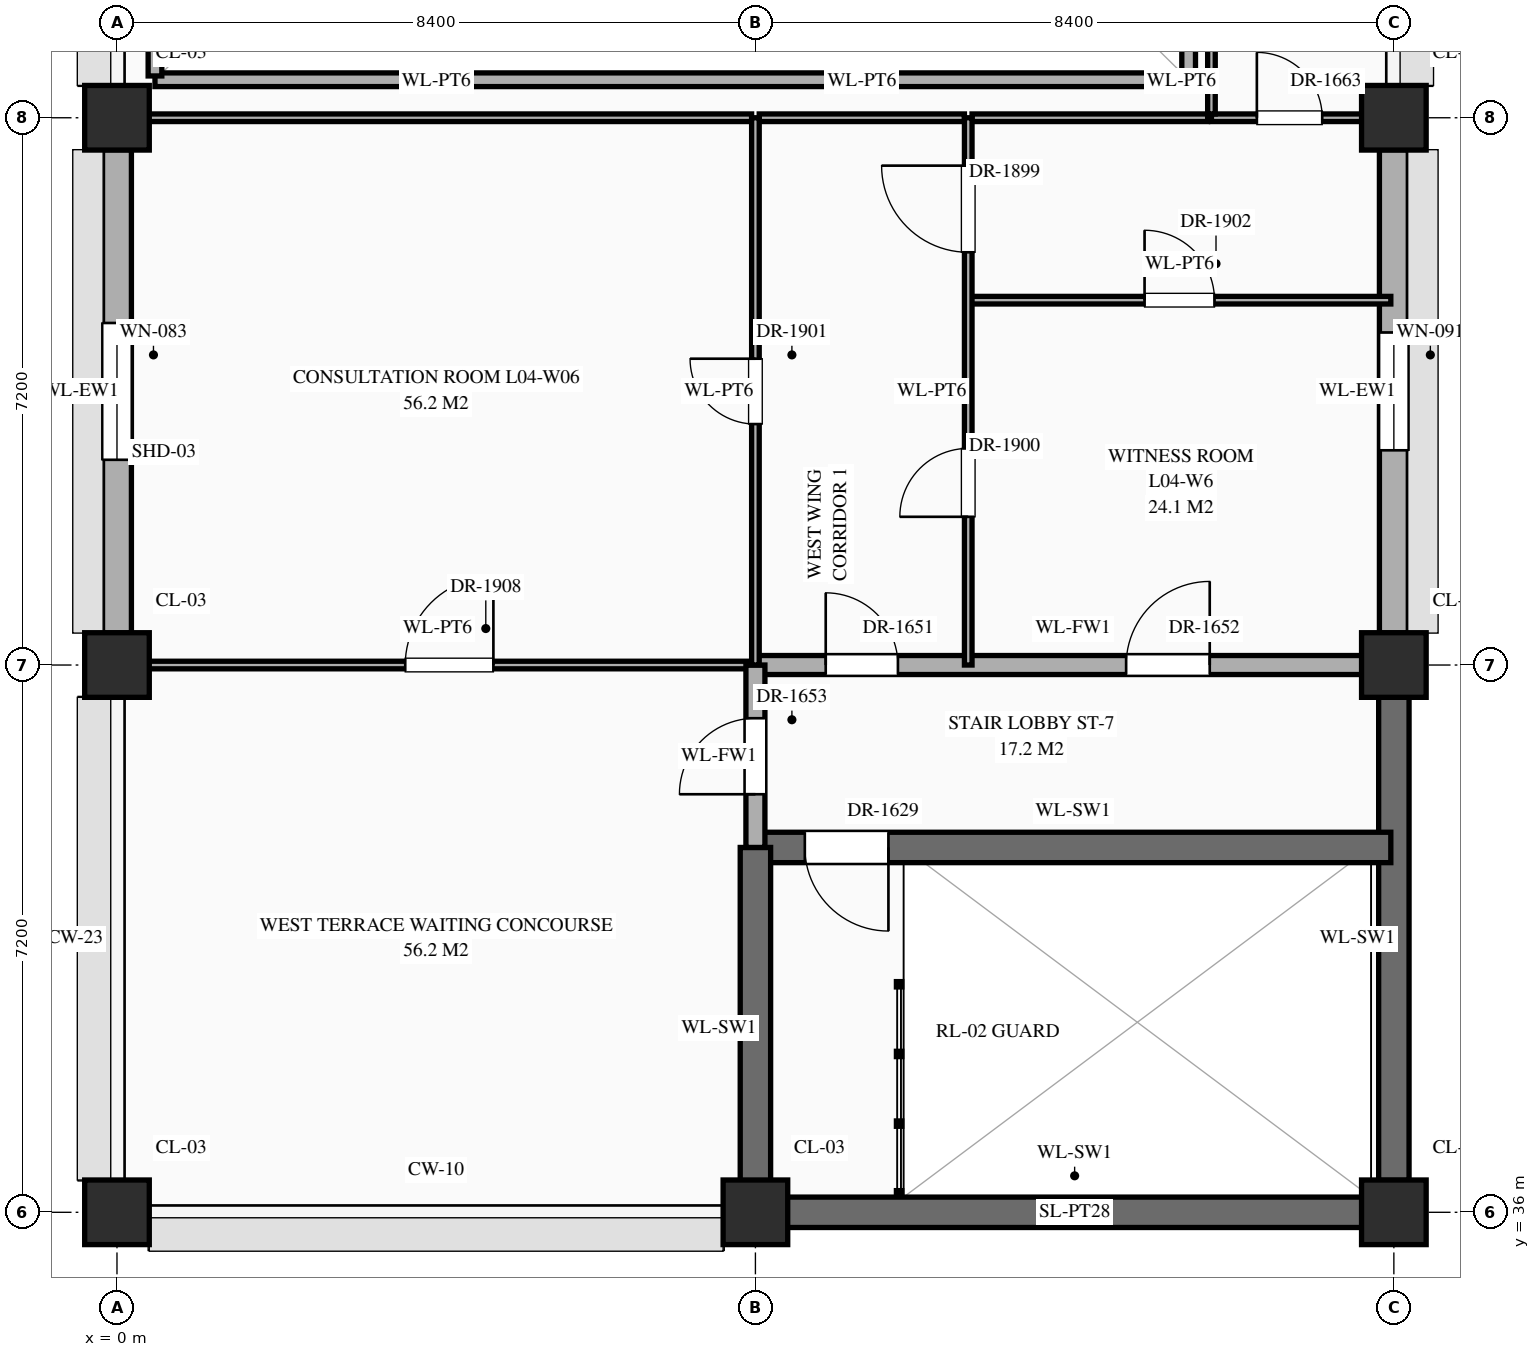
"""IFC4 building model, lengths in metres.
Left out: names, types, materials, properties, quantities, classifications, styles, units other than length and angle.
Written with IfcOpenShell. Run it as: python <this file> out.ifc"""

import sys

from ifc_helpers import new_model, si_unit, direction, frame, frame_2d, origin, origin_2d, place, context, subcontext, project, spatial, rectangle, extrude, element, fill, save


model = new_model("IFC4")
c1 = context("Model", 3, precision=1e-05, world=origin(), true_north=direction((0.0, 1.0)))
c2 = subcontext(c1, "Body", "Model", "MODEL_VIEW")
j1 = project(units=[si_unit("LENGTHUNIT", "METRE"), si_unit("PLANEANGLEUNIT", "RADIAN")], contexts=[c1])
p1 = place(None, origin())
s1 = spatial("IfcSite", under=j1, at=p1, CompositionType="ELEMENT")
p2 = place(p1, origin())
s2 = spatial("IfcBuilding", under=s1, at=p2, CompositionType="ELEMENT")
p3 = place(p2, frame((0.0, 0.0, 16.2)))
s3 = spatial("IfcBuildingStorey", under=s2, at=p3, CompositionType="ELEMENT", Elevation=16.2)
for number, where, z_axis, x_axis in (
    (1, (0.0, 36.0, 0.0), (0.0, 0.0, 1.0), (1.0, 0.0, 0.0)),
    (2, (0.0, 43.2, 0.0), (0.0, 0.0, 1.0), (1.0, 0.0, 0.0)),
    (3, (0.0, 50.4, 0.0), (0.0, 0.0, 1.0), (1.0, 0.0, 0.0)),
    (4, (8.4, 36.0, 0.0), (0.0, 0.0, 1.0), (1.0, 0.0, 0.0)),
    (5, (16.8, 36.0, 0.0), (0.0, 0.0, 1.0), (1.0, 0.0, 0.0)),
    (6, (16.8, 43.2, 0.0), (0.0, 0.0, 1.0), (1.0, 0.0, 0.0)),
    (7, (16.8, 50.4, 0.0), (0.0, 0.0, 1.0), (1.0, 0.0, 0.0)),
):
    element("IfcColumn", number, at=place(p3, frame(where, z_axis=z_axis, x_axis=x_axis)), inside=s3, PredefinedType="COLUMN", context=c2, shape_type="SweptSolid", body=[
        extrude(rectangle(XDim=0.85, YDim=0.85, at=origin_2d()), origin(), (0.0, 0.0, 1.0), 5.4),
    ])
p4 = place(p3, frame((0.0, 43.62, 0.0), z_axis=(0.0, 0.0, 1.0), x_axis=(0.0, 1.0, 0.0)))
e8 = element("IfcWall", 8, at=p4, inside=s3, PredefinedType="STANDARD", context=c2, shape_type="SweptSolid", body=[
    extrude(rectangle(XDim=6.36, YDim=0.38, at=frame_2d((3.18, 0.0))), origin(), (0.0, 0.0, 1.0), 4.55),
])
p5 = place(p4, frame((2.28, 0.0, 0.85)))
e9 = element("IfcOpeningElement", 9, at=p5, cuts=e8, PredefinedType="OPENING", context=c2, shape_type="SweptSolid", body=[
    extrude(rectangle(XDim=1.8, YDim=1.2, at=frame_2d((0.9, 0.6))), frame((0.0, 0.202, 0.0), z_axis=(0.0, -1.0, 0.0), x_axis=(1.0, 0.0, 0.0)), (0.0, 0.0, 1.0), 0.404),
])
p6 = place(p3, frame((8.82, 36.0, 0.0), z_axis=(0.0, 0.0, 1.0), x_axis=(1.0, 0.0, 0.0)))
e10 = element("IfcWall", 10, at=p6, inside=s3, PredefinedType="SHEAR", context=c2, shape_type="SweptSolid", body=[
    extrude(rectangle(XDim=7.56, YDim=0.4, at=frame_2d((3.78, 0.0))), origin(), (0.0, 0.0, 1.0), 5.2),
])
p7 = place(p3, frame((16.8, 36.42, 0.0), z_axis=(0.0, 0.0, 1.0), x_axis=(0.0, 1.0, 0.0)))
e11 = element("IfcWall", 11, at=p7, inside=s3, PredefinedType="SHEAR", context=c2, shape_type="SweptSolid", body=[
    extrude(rectangle(XDim=6.36, YDim=0.4, at=frame_2d((3.18, 0.0))), origin(), (0.0, 0.0, 1.0), 5.2),
])
p8 = place(p3, frame((16.8, 43.62, 0.0), z_axis=(0.0, 0.0, 1.0), x_axis=(0.0, 1.0, 0.0)))
e12 = element("IfcWall", 12, at=p8, inside=s3, PredefinedType="STANDARD", context=c2, shape_type="SweptSolid", body=[
    extrude(rectangle(XDim=6.36, YDim=0.38, at=frame_2d((3.18, 0.0))), origin(), (0.0, 0.0, 1.0), 4.55),
])
p9 = place(p8, frame((2.405, 0.0, 0.85)))
e13 = element("IfcOpeningElement", 13, at=p9, cuts=e12, PredefinedType="OPENING", context=c2, shape_type="SweptSolid", body=[
    extrude(rectangle(XDim=1.55, YDim=1.92, at=frame_2d((0.775, 0.96))), frame((0.0, 0.202, 0.0), z_axis=(0.0, -1.0, 0.0), x_axis=(1.0, 0.0, 0.0)), (0.0, 0.0, 1.0), 0.404),
])
p10 = place(p3, frame((8.4, 40.8, 0.0), z_axis=(0.0, 0.0, 1.0), x_axis=(1.0, 0.0, 0.0)))
e14 = element("IfcWall", 14, at=p10, inside=s3, PredefinedType="SHEAR", context=c2, shape_type="SweptSolid", body=[
    extrude(rectangle(XDim=8.36, YDim=0.4, at=frame_2d((4.18, 0.0))), origin(), (0.0, 0.0, 1.0), 5.2),
])
p11 = place(p10, frame((0.65, 0.0, 0.0)))
e15 = element("IfcOpeningElement", 15, at=p11, cuts=e14, PredefinedType="OPENING", context=c2, shape_type="SweptSolid", body=[
    extrude(rectangle(XDim=1.1, YDim=2.2, at=frame_2d((0.55, 1.1))), frame((0.0, 0.212, 0.0), z_axis=(0.0, -1.0, 0.0), x_axis=(1.0, 0.0, 0.0)), (0.0, 0.0, 1.0), 0.424),
])
p12 = place(p3, frame((0.04, 43.2, 0.0), z_axis=(0.0, 0.0, 1.0), x_axis=(1.0, 0.0, 0.0)))
e16 = element("IfcWall", 16, at=p12, inside=s3, PredefinedType="STANDARD", context=c2, shape_type="SweptSolid", body=[
    extrude(rectangle(XDim=8.36, YDim=0.1, at=frame_2d((4.18, 0.0))), origin(), (0.0, 0.0, 1.0), 4.15),
])
p13 = place(p12, frame((3.752, 0.0, 0.0)))
e17 = element("IfcOpeningElement", 17, at=p13, cuts=e16, PredefinedType="OPENING", context=c2, shape_type="SweptSolid", body=[
    extrude(rectangle(XDim=1.16, YDim=2.3, at=frame_2d((0.58, 1.15))), frame((0.0, 0.062, 0.0), z_axis=(0.0, -1.0, 0.0), x_axis=(1.0, 0.0, 0.0)), (0.0, 0.0, 1.0), 0.124),
])
p14 = place(p3, frame((8.4, 43.2, 0.0), z_axis=(0.0, 0.0, 1.0), x_axis=(1.0, 0.0, 0.0)))
e18 = element("IfcWall", 18, at=p14, inside=s3, PredefinedType="STANDARD", context=c2, shape_type="SweptSolid", body=[
    extrude(rectangle(XDim=8.36, YDim=0.25, at=frame_2d((4.18, 0.0))), origin(), (0.0, 0.0, 1.0), 4.15),
])
p15 = place(p14, frame((0.925, 0.0, 0.0)))
e19 = element("IfcOpeningElement", 19, at=p15, cuts=e18, PredefinedType="OPENING", context=c2, shape_type="SweptSolid", body=[
    extrude(rectangle(XDim=0.95, YDim=2.15, at=frame_2d((0.475, 1.075))), frame((0.0, 0.137, 0.0), z_axis=(0.0, -1.0, 0.0), x_axis=(1.0, 0.0, 0.0)), (0.0, 0.0, 1.0), 0.274),
])
p16 = place(p14, frame((4.877, 0.0, 0.0)))
e20 = element("IfcOpeningElement", 20, at=p16, cuts=e18, PredefinedType="OPENING", context=c2, shape_type="SweptSolid", body=[
    extrude(rectangle(XDim=1.1, YDim=2.2, at=frame_2d((0.55, 1.1))), frame((0.0, 0.137, 0.0), z_axis=(0.0, -1.0, 0.0), x_axis=(1.0, 0.0, 0.0)), (0.0, 0.0, 1.0), 0.274),
])
p17 = place(p3, frame((11.2, 48.0, 0.0), z_axis=(0.0, 0.0, 1.0), x_axis=(1.0, 0.0, 0.0)))
e21 = element("IfcWall", 21, at=p17, inside=s3, PredefinedType="STANDARD", context=c2, shape_type="SweptSolid", body=[
    extrude(rectangle(XDim=5.56, YDim=0.1, at=frame_2d((2.78, 0.0))), origin(), (0.0, 0.0, 1.0), 5.2),
])
p18 = place(p17, frame((2.32, 0.0, 0.0)))
e22 = element("IfcOpeningElement", 22, at=p18, cuts=e21, PredefinedType="OPENING", context=c2, shape_type="SweptSolid", body=[
    extrude(rectangle(XDim=0.92, YDim=2.15, at=frame_2d((0.46, 1.075))), frame((0.0, 0.062, 0.0), z_axis=(0.0, -1.0, 0.0), x_axis=(1.0, 0.0, 0.0)), (0.0, 0.0, 1.0), 0.124),
])
p19 = place(p3, frame((0.05, 50.4, 0.0), z_axis=(0.0, 0.0, 1.0), x_axis=(1.0, 0.0, 0.0)))
e23 = element("IfcWall", 23, at=p19, inside=s3, PredefinedType="STANDARD", context=c2, shape_type="SweptSolid", body=[
    extrude(rectangle(XDim=8.3, YDim=0.1, at=frame_2d((4.15, 0.0))), origin(), (0.0, 0.0, 1.0), 4.15),
])
p20 = place(p3, frame((8.45, 50.4, 0.0), z_axis=(0.0, 0.0, 1.0), x_axis=(1.0, 0.0, 0.0)))
e24 = element("IfcWall", 24, at=p20, inside=s3, PredefinedType="STANDARD", context=c2, shape_type="SweptSolid", body=[
    extrude(rectangle(XDim=2.7, YDim=0.1, at=frame_2d((1.35, 0.0))), origin(), (0.0, 0.0, 1.0), 4.15),
])
p21 = place(p3, frame((11.25, 50.4, 0.0), z_axis=(0.0, 0.0, 1.0), x_axis=(1.0, 0.0, 0.0)))
e25 = element("IfcWall", 25, at=p21, inside=s3, PredefinedType="STANDARD", context=c2, shape_type="SweptSolid", body=[
    extrude(rectangle(XDim=3.1, YDim=0.1, at=frame_2d((1.55, 0.0))), origin(), (0.0, 0.0, 1.0), 4.15),
])
p22 = place(p3, frame((14.4, 50.4, 0.0), z_axis=(0.0, 0.0, 1.0), x_axis=(1.0, 0.0, 0.0)))
e26 = element("IfcWall", 26, at=p22, inside=s3, PredefinedType="STANDARD", context=c2, shape_type="SweptSolid", body=[
    extrude(rectangle(XDim=2.36, YDim=0.1, at=frame_2d((1.18, 0.0))), origin(), (0.0, 0.0, 1.0), 4.15),
])
p23 = place(p22, frame((0.597, 0.0, 0.0)))
e27 = element("IfcOpeningElement", 27, at=p23, cuts=e26, PredefinedType="OPENING", context=c2, shape_type="SweptSolid", body=[
    extrude(rectangle(XDim=0.86, YDim=2.1, at=frame_2d((0.43, 1.05))), frame((0.0, 0.062, 0.0), z_axis=(0.0, -1.0, 0.0), x_axis=(1.0, 0.0, 0.0)), (0.0, 0.0, 1.0), 0.124),
])
p24 = place(p3, frame((0.5, 50.9, 0.0), z_axis=(0.0, 0.0, 1.0), x_axis=(1.0, 0.0, 0.0)))
e28 = element("IfcWall", 28, at=p24, inside=s3, PredefinedType="STANDARD", context=c2, shape_type="SweptSolid", body=[
    extrude(rectangle(XDim=13.6, YDim=0.18, at=frame_2d((6.8, 0.0))), origin(), (0.0, 0.0, 1.0), 5.2),
])
p25 = place(p3, frame((0.5, 50.95, 0.0), z_axis=(0.0, 0.0, 1.0), x_axis=(0.0, 1.0, 0.0)))
e29 = element("IfcWall", 29, at=p25, inside=s3, PredefinedType="STANDARD", context=c2, shape_type="SweptSolid", body=[
    extrude(rectangle(XDim=13.3, YDim=0.18, at=frame_2d((6.65, 0.0))), origin(), (0.0, 0.0, 1.0), 5.2),
])
p26 = place(p3, frame((8.4, 36.04, 0.0), z_axis=(0.0, 0.0, 1.0), x_axis=(0.0, 1.0, 0.0)))
e30 = element("IfcWall", 30, at=p26, inside=s3, PredefinedType="SHEAR", context=c2, shape_type="SweptSolid", body=[
    extrude(rectangle(XDim=4.76, YDim=0.4, at=frame_2d((2.38, 0.0))), origin(), (0.0, 0.0, 1.0), 5.2),
])
p27 = place(p3, frame((8.4, 40.8, 0.0), z_axis=(0.0, 0.0, 1.0), x_axis=(0.0, 1.0, 0.0)))
e31 = element("IfcWall", 31, at=p27, inside=s3, PredefinedType="STANDARD", context=c2, shape_type="SweptSolid", body=[
    extrude(rectangle(XDim=2.4, YDim=0.25, at=frame_2d((1.2, 0.0))), origin(), (0.0, 0.0, 1.0), 5.2),
])
p28 = place(p27, frame((0.7, 0.0, 0.0)))
e32 = element("IfcOpeningElement", 32, at=p28, cuts=e31, PredefinedType="OPENING", context=c2, shape_type="SweptSolid", body=[
    extrude(rectangle(XDim=1.0, YDim=2.2, at=frame_2d((0.5, 1.1))), frame((0.0, 0.137, 0.0), z_axis=(0.0, -1.0, 0.0), x_axis=(1.0, 0.0, 0.0)), (0.0, 0.0, 1.0), 0.274),
])
p29 = place(p3, frame((8.4, 43.2, 0.0), z_axis=(0.0, 0.0, 1.0), x_axis=(0.0, 1.0, 0.0)))
e33 = element("IfcWall", 33, at=p29, inside=s3, PredefinedType="STANDARD", context=c2, shape_type="SweptSolid", body=[
    extrude(rectangle(XDim=7.2, YDim=0.1, at=frame_2d((3.6, 0.0))), origin(), (0.0, 0.0, 1.0), 5.2),
])
p30 = place(p29, frame((3.17, 0.0, 0.0)))
e34 = element("IfcOpeningElement", 34, at=p30, cuts=e33, PredefinedType="OPENING", context=c2, shape_type="SweptSolid", body=[
    extrude(rectangle(XDim=0.86, YDim=2.1, at=frame_2d((0.43, 1.05))), frame((0.0, 0.062, 0.0), z_axis=(0.0, -1.0, 0.0), x_axis=(1.0, 0.0, 0.0)), (0.0, 0.0, 1.0), 0.124),
])
p31 = place(p3, frame((11.2, 43.2, 0.0), z_axis=(0.0, 0.0, 1.0), x_axis=(0.0, 1.0, 0.0)))
e35 = element("IfcWall", 35, at=p31, inside=s3, PredefinedType="STANDARD", context=c2, shape_type="SweptSolid", body=[
    extrude(rectangle(XDim=7.2, YDim=0.1, at=frame_2d((3.6, 0.0))), origin(), (0.0, 0.0, 1.0), 5.2),
])
p32 = place(p31, frame((5.43, 0.0, 0.0)))
e36 = element("IfcOpeningElement", 36, at=p32, cuts=e35, PredefinedType="OPENING", context=c2, shape_type="SweptSolid", body=[
    extrude(rectangle(XDim=1.14, YDim=2.4, at=frame_2d((0.57, 1.2))), frame((0.0, 0.062, 0.0), z_axis=(0.0, -1.0, 0.0), x_axis=(1.0, 0.0, 0.0)), (0.0, 0.0, 1.0), 0.124),
])
p33 = place(p31, frame((1.95, 0.0, 0.0)))
e37 = element("IfcOpeningElement", 37, at=p33, cuts=e35, PredefinedType="OPENING", context=c2, shape_type="SweptSolid", body=[
    extrude(rectangle(XDim=0.9, YDim=2.15, at=frame_2d((0.45, 1.075))), frame((0.0, 0.062, 0.0), z_axis=(0.0, -1.0, 0.0), x_axis=(1.0, 0.0, 0.0)), (0.0, 0.0, 1.0), 0.124),
])
p34 = place(p3, frame((14.1, 50.95, 0.0), z_axis=(0.0, 0.0, 1.0), x_axis=(0.0, 1.0, 0.0)))
e38 = element("IfcWall", 38, at=p34, inside=s3, PredefinedType="STANDARD", context=c2, shape_type="SweptSolid", body=[
    extrude(rectangle(XDim=13.3, YDim=0.18, at=frame_2d((6.65, 0.0))), origin(), (0.0, 0.0, 1.0), 5.2),
])
p35 = place(p3, frame((14.4, 50.45, 0.0), z_axis=(0.0, 0.0, 1.0), x_axis=(0.0, 1.0, 0.0)))
e39 = element("IfcWall", 39, at=p35, inside=s3, PredefinedType="STANDARD", context=c2, shape_type="SweptSolid", body=[
    extrude(rectangle(XDim=14.3, YDim=0.1, at=frame_2d((7.15, 0.0))), origin(), (0.0, 0.0, 1.0), 5.2),
])
p36 = place(p5, origin())
e40 = element("IfcWindow", 40, at=p36, inside=s3, PartitioningType="SINGLE_PANEL", PredefinedType="WINDOW", context=c2, shape_type="SweptSolid", body=[
    extrude(rectangle(XDim=1.8, YDim=1.2, at=frame_2d((0.9, 0.6))), frame((0.0, 0.03, 0.0), z_axis=(0.0, -1.0, 0.0), x_axis=(1.0, 0.0, 0.0)), (0.0, 0.0, 1.0), 0.06),
])
fill(e9, e40)
p37 = place(p9, origin())
e41 = element("IfcWindow", 41, at=p37, inside=s3, PartitioningType="SINGLE_PANEL", PredefinedType="WINDOW", context=c2, shape_type="SweptSolid", body=[
    extrude(rectangle(XDim=1.55, YDim=1.92, at=frame_2d((0.775, 0.96))), frame((0.0, 0.03, 0.0), z_axis=(0.0, -1.0, 0.0), x_axis=(1.0, 0.0, 0.0)), (0.0, 0.0, 1.0), 0.06),
])
fill(e13, e41)
p38 = place(p11, frame((1.1, 0.0, 0.0), z_axis=(0.0, 0.0, 1.0), x_axis=(-1.0, 0.0, 0.0)))
e42 = element("IfcDoor", 42, at=p38, inside=s3, OperationType="SINGLE_SWING_LEFT", PredefinedType="DOOR", context=c2, shape_type="SweptSolid", body=[
    extrude(rectangle(XDim=1.1, YDim=2.2, at=frame_2d((0.55, 1.1))), frame((0.0, 0.025, 0.0), z_axis=(0.0, -1.0, 0.0), x_axis=(1.0, 0.0, 0.0)), (0.0, 0.0, 1.0), 0.05),
])
fill(e15, e42)
p39 = place(p15, origin())
e43 = element("IfcDoor", 43, at=p39, inside=s3, OperationType="SINGLE_SWING_LEFT", PredefinedType="DOOR", context=c2, shape_type="SweptSolid", body=[
    extrude(rectangle(XDim=0.95, YDim=2.15, at=frame_2d((0.475, 1.075))), frame((0.0, 0.025, 0.0), z_axis=(0.0, -1.0, 0.0), x_axis=(1.0, 0.0, 0.0)), (0.0, 0.0, 1.0), 0.05),
])
fill(e19, e43)
p40 = place(p16, origin())
e44 = element("IfcDoor", 44, at=p40, inside=s3, OperationType="SINGLE_SWING_RIGHT", PredefinedType="DOOR", context=c2, shape_type="SweptSolid", body=[
    extrude(rectangle(XDim=1.1, YDim=2.2, at=frame_2d((0.55, 1.1))), frame((0.0, 0.025, 0.0), z_axis=(0.0, -1.0, 0.0), x_axis=(1.0, 0.0, 0.0)), (0.0, 0.0, 1.0), 0.05),
])
fill(e20, e44)
p41 = place(p28, origin())
e45 = element("IfcDoor", 45, at=p41, inside=s3, OperationType="SINGLE_SWING_LEFT", PredefinedType="DOOR", context=c2, shape_type="SweptSolid", body=[
    extrude(rectangle(XDim=1.0, YDim=2.2, at=frame_2d((0.5, 1.1))), frame((0.0, 0.025, 0.0), z_axis=(0.0, -1.0, 0.0), x_axis=(1.0, 0.0, 0.0)), (0.0, 0.0, 1.0), 0.05),
])
fill(e32, e45)
p42 = place(p23, origin())
e46 = element("IfcDoor", 46, at=p42, inside=s3, OperationType="SINGLE_SWING_LEFT", PredefinedType="DOOR", context=c2, shape_type="SweptSolid", body=[
    extrude(rectangle(XDim=0.86, YDim=2.1, at=frame_2d((0.43, 1.05))), frame((0.0, 0.025, 0.0), z_axis=(0.0, -1.0, 0.0), x_axis=(1.0, 0.0, 0.0)), (0.0, 0.0, 1.0), 0.05),
])
fill(e27, e46)
p43 = place(p32, origin())
e47 = element("IfcDoor", 47, at=p43, inside=s3, OperationType="SINGLE_SWING_RIGHT", PredefinedType="DOOR", context=c2, shape_type="SweptSolid", body=[
    extrude(rectangle(XDim=1.14, YDim=2.4, at=frame_2d((0.57, 1.2))), frame((0.0, 0.025, 0.0), z_axis=(0.0, -1.0, 0.0), x_axis=(1.0, 0.0, 0.0)), (0.0, 0.0, 1.0), 0.05),
])
fill(e36, e47)
p44 = place(p33, origin())
e48 = element("IfcDoor", 48, at=p44, inside=s3, OperationType="SINGLE_SWING_LEFT", PredefinedType="DOOR", context=c2, shape_type="SweptSolid", body=[
    extrude(rectangle(XDim=0.9, YDim=2.15, at=frame_2d((0.45, 1.075))), frame((0.0, 0.025, 0.0), z_axis=(0.0, -1.0, 0.0), x_axis=(1.0, 0.0, 0.0)), (0.0, 0.0, 1.0), 0.05),
])
fill(e37, e48)
p45 = place(p30, origin())
e49 = element("IfcDoor", 49, at=p45, inside=s3, OperationType="SINGLE_SWING_RIGHT", PredefinedType="DOOR", context=c2, shape_type="SweptSolid", body=[
    extrude(rectangle(XDim=0.86, YDim=2.1, at=frame_2d((0.43, 1.05))), frame((0.0, 0.025, 0.0), z_axis=(0.0, -1.0, 0.0), x_axis=(1.0, 0.0, 0.0)), (0.0, 0.0, 1.0), 0.05),
])
fill(e34, e49)
p46 = place(p18, origin())
e50 = element("IfcDoor", 50, at=p46, inside=s3, OperationType="SINGLE_SWING_LEFT", PredefinedType="DOOR", context=c2, shape_type="SweptSolid", body=[
    extrude(rectangle(XDim=0.92, YDim=2.15, at=frame_2d((0.46, 1.075))), frame((0.0, 0.025, 0.0), z_axis=(0.0, -1.0, 0.0), x_axis=(1.0, 0.0, 0.0)), (0.0, 0.0, 1.0), 0.05),
])
fill(e22, e50)
p47 = place(p13, origin())
e51 = element("IfcDoor", 51, at=p47, inside=s3, OperationType="SINGLE_SWING_RIGHT", PredefinedType="DOOR", context=c2, shape_type="SweptSolid", body=[
    extrude(rectangle(XDim=1.16, YDim=2.3, at=frame_2d((0.58, 1.15))), frame((0.0, 0.025, 0.0), z_axis=(0.0, -1.0, 0.0), x_axis=(1.0, 0.0, 0.0)), (0.0, 0.0, 1.0), 0.05),
])
fill(e17, e51)
save(model, sys.argv[1])
